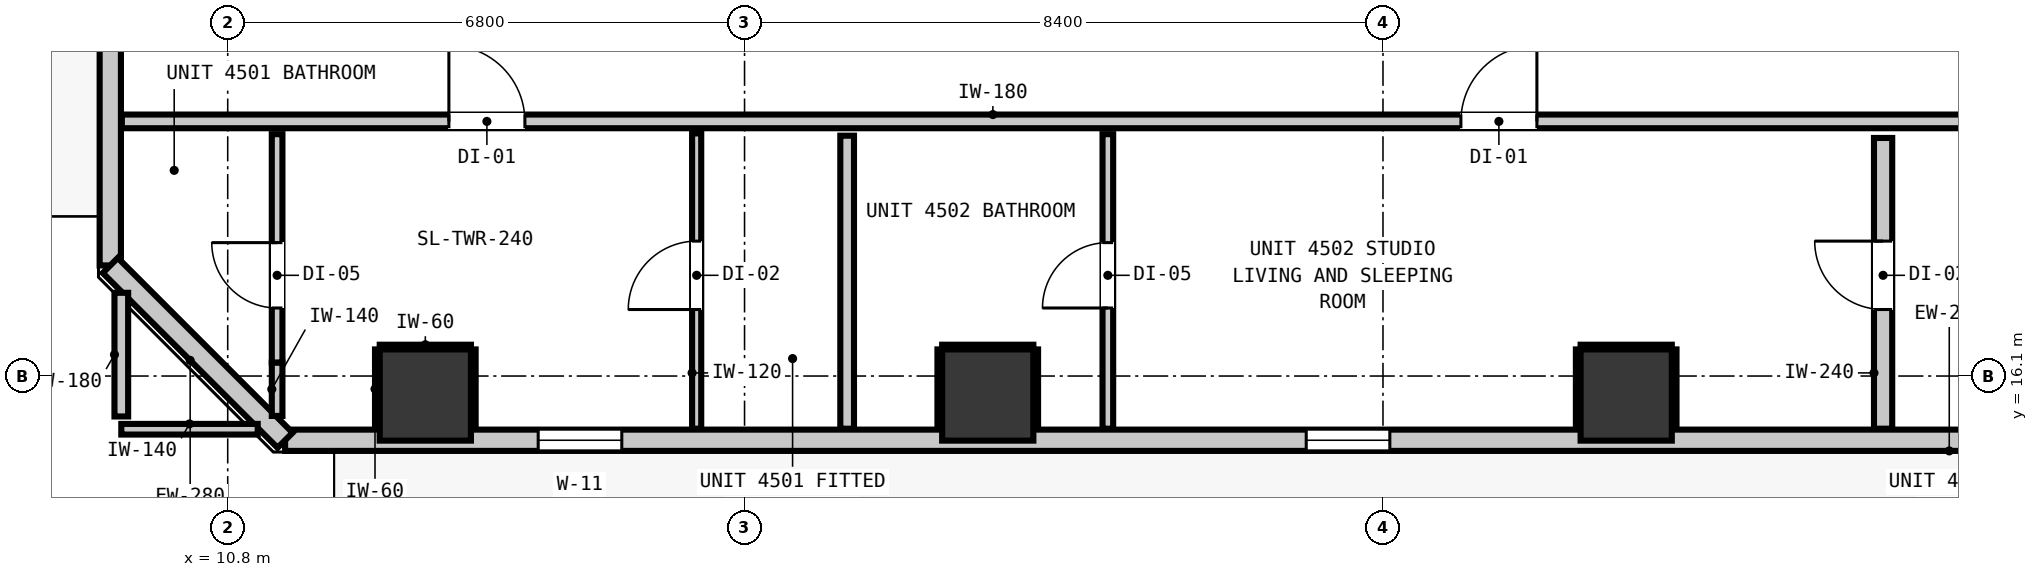
"""IFC4 building model, lengths in metres.
Left out: names, types, materials, properties, quantities, classifications, styles, units other than length and angle.
Written with IfcOpenShell. Run it as: python <this file> out.ifc"""

import sys

from ifc_helpers import new_model, si_unit, direction, frame, frame_2d, origin, origin_2d, place, context, subcontext, project, spatial, rectangle, extrude, element, fill, save


model = new_model("IFC4")
c1 = context("Model", 3, precision=1e-05, world=origin(), true_north=direction((0.0, 1.0)))
c2 = subcontext(c1, "Body", "Model", "MODEL_VIEW")
j1 = project(units=[si_unit("LENGTHUNIT", "METRE"), si_unit("PLANEANGLEUNIT", "RADIAN")], contexts=[c1])
p1 = place(None, origin())
s1 = spatial("IfcSite", under=j1, at=p1, CompositionType="ELEMENT")
p2 = place(p1, origin())
s2 = spatial("IfcBuilding", under=s1, at=p2, CompositionType="ELEMENT")
p3 = place(p2, frame((0.0, 0.0, 155.88)))
s3 = spatial("IfcBuildingStorey", under=s2, at=p3, CompositionType="ELEMENT", Elevation=155.88)
for number, where, z_axis, x_axis in (
    (1, (13.4, 15.85, 0.0), (0.0, 0.0, 1.0), (1.0, 0.0, 0.0)),
    (2, (20.8, 15.85, 0.0), (0.0, 0.0, 1.0), (1.0, 0.0, 0.0)),
    (3, (29.2, 15.85, 0.0), (0.0, 0.0, 1.0), (1.0, 0.0, 0.0)),
):
    element("IfcColumn", number, at=place(p3, frame(where, z_axis=z_axis, x_axis=x_axis)), inside=s3, PredefinedType="COLUMN", context=c2, shape_type="SweptSolid", body=[
        extrude(rectangle(XDim=1.2, YDim=1.2, at=origin_2d()), origin(), (0.0, 0.0, 1.0), 3.32),
    ])
p4 = place(p3, frame((9.255, 17.555, 0.0), z_axis=(0.0, 0.0, 1.0), x_axis=(0.0, 1.0, 0.0)))
e4 = element("IfcWall", 4, at=p4, inside=s3, PredefinedType="STANDARD", context=c2, shape_type="SweptSolid", body=[
    extrude(rectangle(XDim=32.29, YDim=0.28, at=frame_2d((16.145, 0.0))), origin(), (0.0, 0.0, 1.0), 3.08),
])
p5 = place(p4, frame((5.467, 0.0, 0.0)))
e5 = element("IfcOpeningElement", 5, at=p5, cuts=e4, PredefinedType="OPENING", context=c2, shape_type="SweptSolid", body=[
    extrude(rectangle(XDim=1.0, YDim=2.15, at=frame_2d((0.5, 1.075))), frame((0.0, 0.15, 0.0), z_axis=(0.0, -1.0, 0.0), x_axis=(1.0, 0.0, 0.0)), (0.0, 0.0, 1.0), 0.3),
])
p6 = place(p4, frame((30.727, 0.0, 0.85)))
e6 = element("IfcOpeningElement", 6, at=p6, cuts=e4, PredefinedType="OPENING", context=c2, shape_type="SweptSolid", body=[
    extrude(rectangle(XDim=1.1, YDim=2.05, at=frame_2d((0.55, 1.025))), frame((0.0, 0.15, 0.0), z_axis=(0.0, -1.0, 0.0), x_axis=(1.0, 0.0, 0.0)), (0.0, 0.0, 1.0), 0.3),
])
p7 = place(p3, frame((46.645, 15.255, 0.0), z_axis=(0.0, 0.0, 1.0), x_axis=(-1.0, 0.0, 0.0)))
e7 = element("IfcWall", 7, at=p7, inside=s3, PredefinedType="STANDARD", context=c2, shape_type="SweptSolid", body=[
    extrude(rectangle(XDim=35.09, YDim=0.28, at=frame_2d((17.545, 0.0))), origin(), (0.0, 0.0, 1.0), 3.08),
])
p8 = place(p7, frame((0.904, 0.0, 0.0)))
e8 = element("IfcOpeningElement", 8, at=p8, cuts=e7, PredefinedType="OPENING", context=c2, shape_type="SweptSolid", body=[
    extrude(rectangle(XDim=1.0, YDim=2.15, at=frame_2d((0.5, 1.075))), frame((0.0, 0.15, 0.0), z_axis=(0.0, -1.0, 0.0), x_axis=(1.0, 0.0, 0.0)), (0.0, 0.0, 1.0), 0.3),
])
p9 = place(p7, frame((30.66, 0.0, 0.85)))
e9 = element("IfcOpeningElement", 9, at=p9, cuts=e7, PredefinedType="OPENING", context=c2, shape_type="SweptSolid", body=[
    extrude(rectangle(XDim=1.1, YDim=2.05, at=frame_2d((0.55, 1.025))), frame((0.0, 0.15, 0.0), z_axis=(0.0, -1.0, 0.0), x_axis=(1.0, 0.0, 0.0)), (0.0, 0.0, 1.0), 0.3),
])
p10 = place(p7, frame((20.555, 0.0, 0.85)))
e10 = element("IfcOpeningElement", 10, at=p10, cuts=e7, PredefinedType="OPENING", context=c2, shape_type="SweptSolid", body=[
    extrude(rectangle(XDim=1.1, YDim=2.05, at=frame_2d((0.55, 1.025))), frame((0.0, 0.15, 0.0), z_axis=(0.0, -1.0, 0.0), x_axis=(1.0, 0.0, 0.0)), (0.0, 0.0, 1.0), 0.3),
])
p11 = place(p7, frame((4.734, 0.0, 0.85)))
e11 = element("IfcOpeningElement", 11, at=p11, cuts=e7, PredefinedType="OPENING", context=c2, shape_type="SweptSolid", body=[
    extrude(rectangle(XDim=1.1, YDim=2.05, at=frame_2d((0.55, 1.025))), frame((0.0, 0.15, 0.0), z_axis=(0.0, -1.0, 0.0), x_axis=(1.0, 0.0, 0.0)), (0.0, 0.0, 1.0), 0.3),
])
p12 = place(p3, frame((11.555, 15.255, 0.0), z_axis=(0.0, 0.0, 1.0), x_axis=(-0.707106781187, 0.707106781187, 0.0)))
e12 = element("IfcWall", 12, at=p12, inside=s3, PredefinedType="STANDARD", context=c2, shape_type="SweptSolid", body=[
    extrude(rectangle(XDim=3.253, YDim=0.28, at=frame_2d((1.626, 0.0))), origin(), (0.0, 0.0, 1.0), 3.08),
])
p13 = place(p3, frame((9.407, 19.45, 0.0), z_axis=(0.0, 0.0, 1.0), x_axis=(1.0, 0.0, 0.0)))
e13 = element("IfcWall", 13, at=p13, inside=s3, PredefinedType="PARTITIONING", context=c2, shape_type="SweptSolid", body=[
    extrude(rectangle(XDim=27.532, YDim=0.18, at=frame_2d((13.766, 0.0))), origin(), (0.0, 0.0, 1.0), 3.08),
])
p14 = place(p13, frame((4.303, 0.0, 0.0)))
e14 = element("IfcOpeningElement", 14, at=p14, cuts=e13, PredefinedType="OPENING", context=c2, shape_type="SweptSolid", body=[
    extrude(rectangle(XDim=1.0, YDim=2.15, at=frame_2d((0.5, 1.075))), frame((0.0, 0.1, 0.0), z_axis=(0.0, -1.0, 0.0), x_axis=(1.0, 0.0, 0.0)), (0.0, 0.0, 1.0), 0.2),
])
p15 = place(p13, frame((17.618, 0.0, 0.0)))
e15 = element("IfcOpeningElement", 15, at=p15, cuts=e13, PredefinedType="OPENING", context=c2, shape_type="SweptSolid", body=[
    extrude(rectangle(XDim=1.0, YDim=2.15, at=frame_2d((0.5, 1.075))), frame((0.0, 0.1, 0.0), z_axis=(0.0, -1.0, 0.0), x_axis=(1.0, 0.0, 0.0)), (0.0, 0.0, 1.0), 0.2),
])
p16 = place(p3, frame((9.4, 15.4, 0.0), z_axis=(0.0, 0.0, 1.0), x_axis=(1.0, 0.0, 0.0)))
e16 = element("IfcWall", 16, at=p16, inside=s3, PredefinedType="PARTITIONING", context=c2, shape_type="SweptSolid", body=[
    extrude(rectangle(XDim=1.795, YDim=0.14, at=frame_2d((0.897, 0.0))), origin(), (0.0, 0.0, 1.0), 3.08),
])
p17 = place(p3, frame((32.58, 15.407, 0.0), z_axis=(0.0, 0.0, 1.0), x_axis=(0.0, 1.0, 0.0)))
e17 = element("IfcWall", 17, at=p17, inside=s3, PredefinedType="PARTITIONING", context=c2, shape_type="SweptSolid", body=[
    extrude(rectangle(XDim=3.825, YDim=0.24, at=frame_2d((1.913, 0.0))), origin(), (0.0, 0.0, 1.0), 3.08),
])
p18 = place(p17, frame((1.568, 0.0, 0.0)))
e18 = element("IfcOpeningElement", 18, at=p18, cuts=e17, PredefinedType="OPENING", context=c2, shape_type="SweptSolid", body=[
    extrude(rectangle(XDim=0.9, YDim=2.1, at=frame_2d((0.45, 1.05))), frame((0.0, 0.13, 0.0), z_axis=(0.0, -1.0, 0.0), x_axis=(1.0, 0.0, 0.0)), (0.0, 0.0, 1.0), 0.26),
])
p19 = place(p3, frame((9.4, 15.568, 0.0), z_axis=(0.0, 0.0, 1.0), x_axis=(0.0, 1.0, 0.0)))
e19 = element("IfcWall", 19, at=p19, inside=s3, PredefinedType="PARTITIONING", context=c2, shape_type="SweptSolid", body=[
    extrude(rectangle(XDim=1.627, YDim=0.18, at=frame_2d((0.813, 0.0))), origin(), (0.0, 0.0, 1.0), 3.08),
])
p20 = place(p3, frame((18.95, 15.407, 0.0), z_axis=(0.0, 0.0, 1.0), x_axis=(0.0, 1.0, 0.0)))
e20 = element("IfcWall", 20, at=p20, inside=s3, PredefinedType="PARTITIONING", context=c2, shape_type="SweptSolid", body=[
    extrude(rectangle(XDim=3.855, YDim=0.18, at=frame_2d((1.927, 0.0))), origin(), (0.0, 0.0, 1.0), 3.08),
])
p21 = place(p3, frame((11.45, 15.575, 0.0), z_axis=(0.0, 0.0, 1.0), x_axis=(0.0, 1.0, 0.0)))
e21 = element("IfcWall", 21, at=p21, inside=s3, PredefinedType="PARTITIONING", context=c2, shape_type="SweptSolid", body=[
    extrude(rectangle(XDim=0.703, YDim=0.14, at=frame_2d((0.352, 0.0))), origin(), (0.0, 0.0, 1.0), 3.08),
])
p22 = place(p3, frame((11.45, 16.278, 0.0), z_axis=(0.0, 0.0, 1.0), x_axis=(0.0, 1.0, 0.0)))
e22 = element("IfcWall", 22, at=p22, inside=s3, PredefinedType="PARTITIONING", context=c2, shape_type="SweptSolid", body=[
    extrude(rectangle(XDim=3.004, YDim=0.14, at=frame_2d((1.502, 0.0))), origin(), (0.0, 0.0, 1.0), 2.565),
])
p23 = place(p22, frame((0.717, 0.0, 0.0)))
e23 = element("IfcOpeningElement", 23, at=p23, cuts=e22, PredefinedType="OPENING", context=c2, shape_type="SweptSolid", body=[
    extrude(rectangle(XDim=0.86, YDim=2.02, at=frame_2d((0.43, 1.01))), frame((0.0, 0.08, 0.0), z_axis=(0.0, -1.0, 0.0), x_axis=(1.0, 0.0, 0.0)), (0.0, 0.0, 1.0), 0.16),
])
p24 = place(p3, frame((22.38, 15.407, 0.0), z_axis=(0.0, 0.0, 1.0), x_axis=(0.0, 1.0, 0.0)))
e24 = element("IfcWall", 24, at=p24, inside=s3, PredefinedType="PARTITIONING", context=c2, shape_type="SweptSolid", body=[
    extrude(rectangle(XDim=3.875, YDim=0.14, at=frame_2d((1.938, 0.0))), origin(), (0.0, 0.0, 1.0), 3.08),
])
p25 = place(p24, frame((1.588, 0.0, 0.0)))
e25 = element("IfcOpeningElement", 25, at=p25, cuts=e24, PredefinedType="OPENING", context=c2, shape_type="SweptSolid", body=[
    extrude(rectangle(XDim=0.86, YDim=2.02, at=frame_2d((0.43, 1.01))), frame((0.0, 0.08, 0.0), z_axis=(0.0, -1.0, 0.0), x_axis=(1.0, 0.0, 0.0)), (0.0, 0.0, 1.0), 0.16),
])
p26 = place(p3, frame((16.97, 15.407, 0.0), z_axis=(0.0, 0.0, 1.0), x_axis=(0.0, 1.0, 0.0)))
e26 = element("IfcWall", 26, at=p26, inside=s3, PredefinedType="PARTITIONING", context=c2, shape_type="SweptSolid", body=[
    extrude(rectangle(XDim=3.885, YDim=0.12, at=frame_2d((1.942, 0.0))), origin(), (0.0, 0.0, 1.0), 3.08),
])
p27 = place(p26, frame((1.568, 0.0, 0.0)))
e27 = element("IfcOpeningElement", 27, at=p27, cuts=e26, PredefinedType="OPENING", context=c2, shape_type="SweptSolid", body=[
    extrude(rectangle(XDim=0.9, YDim=2.1, at=frame_2d((0.45, 1.05))), frame((0.0, 0.07, 0.0), z_axis=(0.0, -1.0, 0.0), x_axis=(1.0, 0.0, 0.0)), (0.0, 0.0, 1.0), 0.14),
])
p28 = place(p3, frame((12.8, 16.482, 0.0), z_axis=(0.0, 0.0, 1.0), x_axis=(1.0, 0.0, 0.0)))
e28 = element("IfcWall", 28, at=p28, inside=s3, PredefinedType="PARTITIONING", context=c2, shape_type="SweptSolid", body=[
    extrude(rectangle(XDim=1.2, YDim=0.06, at=frame_2d((0.6, 0.0))), origin(), (0.0, 0.0, 1.0), 1.45),
])
for number, where, z_axis, x_axis in (
    (29, (12.768, 15.41, 0.0), (0.0, 0.0, 1.0), (0.0, 1.0, 0.0)),
    (30, (14.032, 15.41, 0.0), (0.0, 0.0, 1.0), (0.0, 1.0, 0.0)),
):
    element("IfcWall", number, at=place(p3, frame(where, z_axis=z_axis, x_axis=x_axis)), inside=s3, PredefinedType="PARTITIONING", context=c2, shape_type="SweptSolid", body=[
        extrude(rectangle(XDim=1.04, YDim=0.06, at=frame_2d((0.52, 0.0))), origin(), (0.0, 0.0, 1.0), 1.45),
    ])
p29 = place(p3, frame((20.2, 16.482, 0.0), z_axis=(0.0, 0.0, 1.0), x_axis=(1.0, 0.0, 0.0)))
e31 = element("IfcWall", 31, at=p29, inside=s3, PredefinedType="PARTITIONING", context=c2, shape_type="SweptSolid", body=[
    extrude(rectangle(XDim=1.2, YDim=0.06, at=frame_2d((0.6, 0.0))), origin(), (0.0, 0.0, 1.0), 1.45),
])
for number, where, z_axis, x_axis in (
    (32, (20.168, 15.41, 0.0), (0.0, 0.0, 1.0), (0.0, 1.0, 0.0)),
    (33, (21.432, 15.41, 0.0), (0.0, 0.0, 1.0), (0.0, 1.0, 0.0)),
):
    element("IfcWall", number, at=place(p3, frame(where, z_axis=z_axis, x_axis=x_axis)), inside=s3, PredefinedType="PARTITIONING", context=c2, shape_type="SweptSolid", body=[
        extrude(rectangle(XDim=1.04, YDim=0.06, at=frame_2d((0.52, 0.0))), origin(), (0.0, 0.0, 1.0), 1.45),
    ])
p30 = place(p3, frame((28.6, 16.482, 0.0), z_axis=(0.0, 0.0, 1.0), x_axis=(1.0, 0.0, 0.0)))
e34 = element("IfcWall", 34, at=p30, inside=s3, PredefinedType="PARTITIONING", context=c2, shape_type="SweptSolid", body=[
    extrude(rectangle(XDim=1.2, YDim=0.06, at=frame_2d((0.6, 0.0))), origin(), (0.0, 0.0, 1.0), 1.45),
])
for number, where, z_axis, x_axis in (
    (35, (28.568, 15.41, 0.0), (0.0, 0.0, 1.0), (0.0, 1.0, 0.0)),
    (36, (29.832, 15.41, 0.0), (0.0, 0.0, 1.0), (0.0, 1.0, 0.0)),
):
    element("IfcWall", number, at=place(p3, frame(where, z_axis=z_axis, x_axis=x_axis)), inside=s3, PredefinedType="PARTITIONING", context=c2, shape_type="SweptSolid", body=[
        extrude(rectangle(XDim=1.04, YDim=0.06, at=frame_2d((0.52, 0.0))), origin(), (0.0, 0.0, 1.0), 1.45),
    ])
p31 = place(p9, origin())
e37 = element("IfcWindow", 37, at=p31, inside=s3, PartitioningType="SINGLE_PANEL", PredefinedType="WINDOW", context=c2, shape_type="SweptSolid", body=[
    extrude(rectangle(XDim=1.1, YDim=2.05, at=frame_2d((0.55, 1.025))), frame((0.0, 0.03, 0.0), z_axis=(0.0, -1.0, 0.0), x_axis=(1.0, 0.0, 0.0)), (0.0, 0.0, 1.0), 0.06),
])
fill(e9, e37)
p32 = place(p10, origin())
e38 = element("IfcWindow", 38, at=p32, inside=s3, PartitioningType="SINGLE_PANEL", PredefinedType="WINDOW", context=c2, shape_type="SweptSolid", body=[
    extrude(rectangle(XDim=1.1, YDim=2.05, at=frame_2d((0.55, 1.025))), frame((0.0, 0.03, 0.0), z_axis=(0.0, -1.0, 0.0), x_axis=(1.0, 0.0, 0.0)), (0.0, 0.0, 1.0), 0.06),
])
fill(e10, e38)
p33 = place(p14, origin())
e39 = element("IfcDoor", 39, at=p33, inside=s3, OperationType="SINGLE_SWING_LEFT", PredefinedType="DOOR", context=c2, shape_type="SweptSolid", body=[
    extrude(rectangle(XDim=1.0, YDim=2.15, at=frame_2d((0.5, 1.075))), frame((0.0, 0.025, 0.0), z_axis=(0.0, -1.0, 0.0), x_axis=(1.0, 0.0, 0.0)), (0.0, 0.0, 1.0), 0.05),
])
fill(e14, e39)
p34 = place(p23, origin())
e40 = element("IfcDoor", 40, at=p34, inside=s3, OperationType="SINGLE_SWING_RIGHT", PredefinedType="DOOR", context=c2, shape_type="SweptSolid", body=[
    extrude(rectangle(XDim=0.86, YDim=2.02, at=frame_2d((0.43, 1.01))), frame((0.0, 0.025, 0.0), z_axis=(0.0, -1.0, 0.0), x_axis=(1.0, 0.0, 0.0)), (0.0, 0.0, 1.0), 0.05),
])
fill(e23, e40)
p35 = place(p27, origin())
e41 = element("IfcDoor", 41, at=p35, inside=s3, OperationType="SINGLE_SWING_LEFT", PredefinedType="DOOR", context=c2, shape_type="SweptSolid", body=[
    extrude(rectangle(XDim=0.9, YDim=2.1, at=frame_2d((0.45, 1.05))), frame((0.0, 0.025, 0.0), z_axis=(0.0, -1.0, 0.0), x_axis=(1.0, 0.0, 0.0)), (0.0, 0.0, 1.0), 0.05),
])
fill(e27, e41)
p36 = place(p15, origin())
e42 = element("IfcDoor", 42, at=p36, inside=s3, OperationType="SINGLE_SWING_RIGHT", PredefinedType="DOOR", context=c2, shape_type="SweptSolid", body=[
    extrude(rectangle(XDim=1.0, YDim=2.15, at=frame_2d((0.5, 1.075))), frame((0.0, 0.025, 0.0), z_axis=(0.0, -1.0, 0.0), x_axis=(1.0, 0.0, 0.0)), (0.0, 0.0, 1.0), 0.05),
])
fill(e15, e42)
p37 = place(p25, origin())
e43 = element("IfcDoor", 43, at=p37, inside=s3, OperationType="SINGLE_SWING_LEFT", PredefinedType="DOOR", context=c2, shape_type="SweptSolid", body=[
    extrude(rectangle(XDim=0.86, YDim=2.02, at=frame_2d((0.43, 1.01))), frame((0.0, 0.025, 0.0), z_axis=(0.0, -1.0, 0.0), x_axis=(1.0, 0.0, 0.0)), (0.0, 0.0, 1.0), 0.05),
])
fill(e25, e43)
p38 = place(p18, origin())
e44 = element("IfcDoor", 44, at=p38, inside=s3, OperationType="SINGLE_SWING_RIGHT", PredefinedType="DOOR", context=c2, shape_type="SweptSolid", body=[
    extrude(rectangle(XDim=0.9, YDim=2.1, at=frame_2d((0.45, 1.05))), frame((0.0, 0.025, 0.0), z_axis=(0.0, -1.0, 0.0), x_axis=(1.0, 0.0, 0.0)), (0.0, 0.0, 1.0), 0.05),
])
fill(e18, e44)
save(model, sys.argv[1])
